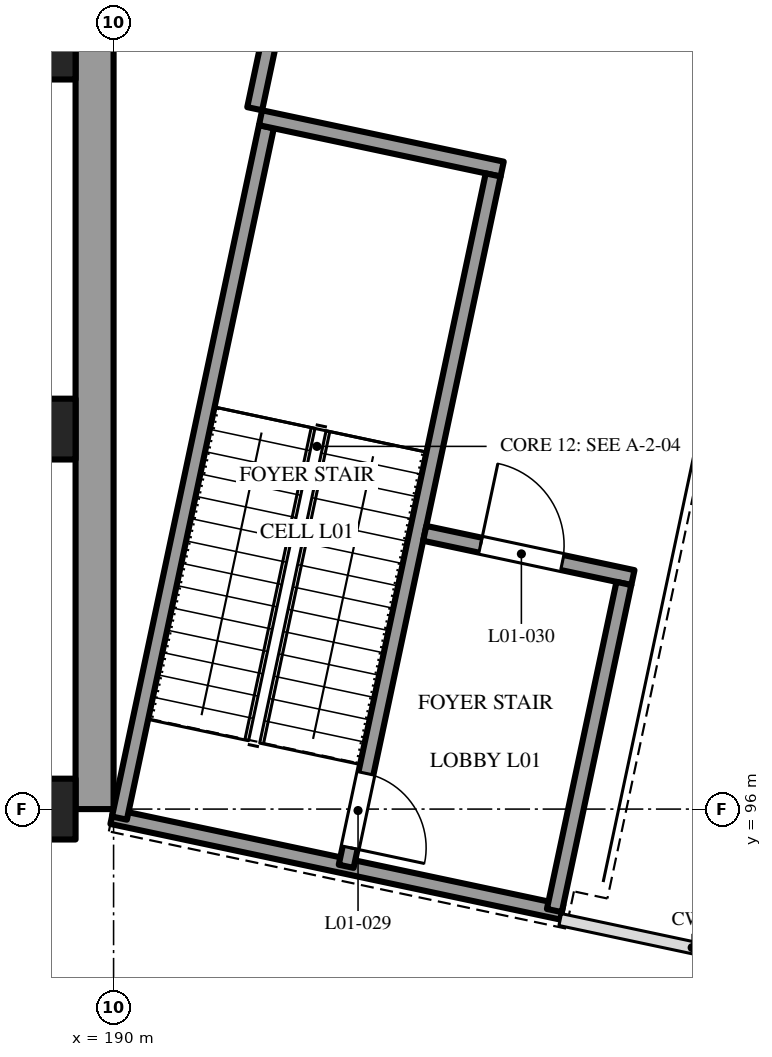
"""IFC4 building model, lengths in metres.
Left out: names, types, materials, properties, quantities, classifications, styles, units other than length and angle.
Written with IfcOpenShell. Run it as: python <this file> out.ifc"""

import sys

from ifc_helpers import new_model, si_unit, direction, frame, frame_2d, origin, origin_2d, place, context, subcontext, project, spatial, rectangle, extrude, element, fill, save


model = new_model("IFC4")
c1 = context("Model", 3, precision=1e-05, world=origin(), true_north=direction((0.0, 1.0)))
c2 = subcontext(c1, "Body", "Model", "MODEL_VIEW")
j1 = project(units=[si_unit("LENGTHUNIT", "METRE"), si_unit("PLANEANGLEUNIT", "RADIAN")], contexts=[c1])
p1 = place(None, origin())
s1 = spatial("IfcSite", under=j1, at=p1, CompositionType="ELEMENT")
p2 = place(p1, origin())
s2 = spatial("IfcBuilding", under=s1, at=p2, CompositionType="ELEMENT")
p3 = place(p2, frame((0.0, 0.0, 7.2)))
s3 = spatial("IfcBuildingStorey", under=s2, at=p3, CompositionType="ELEMENT", Elevation=7.2)
for number, where, z_axis, x_axis in (
    (1, (189.0, 96.0, 0.0), (0.0, 0.0, 1.0), (1.0, 0.0, 0.0)),
    (2, (189.0, 101.0, 0.0), (0.0, 0.0, 1.0), (1.0, 0.0, 0.0)),
    (3, (189.0, 106.0, 0.0), (0.0, 0.0, 1.0), (1.0, 0.0, 0.0)),
):
    element("IfcColumn", number, at=place(p3, frame(where, z_axis=z_axis, x_axis=x_axis)), inside=s3, PredefinedType="COLUMN", context=c2, shape_type="SweptSolid", body=[
        extrude(rectangle(XDim=1.0, YDim=0.8, at=origin_2d()), origin(), (0.0, 0.0, 1.0), 1.8),
    ])
p4 = place(p3, frame((189.75, 96.0, 0.0), z_axis=(0.0, 0.0, 1.0), x_axis=(0.0, 1.0, 0.0)))
e4 = element("IfcWall", 4, at=p4, inside=s3, PredefinedType="SOLIDWALL", context=c2, shape_type="SweptSolid", body=[
    extrude(rectangle(XDim=46.0, YDim=0.5, at=frame_2d((23.0, 0.0))), origin(), (0.0, 0.0, 1.0), 6.6),
])
p5 = place(p3, frame((189.979, 95.902, 0.0), z_axis=(0.0, 0.0, 1.0), x_axis=(0.978148901478, -0.207905571204, 0.0)))
e5 = element("IfcWall", 5, at=p5, inside=s3, PredefinedType="SOLIDWALL", context=c2, shape_type="SweptSolid", body=[
    extrude(rectangle(XDim=6.05, YDim=0.2, at=frame_2d((3.025, 0.0))), origin(), (0.0, 0.0, 1.0), 4.48),
])
p6 = place(p3, frame((190.077, 95.881, 0.0), z_axis=(0.0, 0.0, 1.0), x_axis=(0.207909931549, 0.978147974676, 0.0)))
e6 = element("IfcWall", 6, at=p6, inside=s3, PredefinedType="SOLIDWALL", context=c2, shape_type="SweptSolid", body=[
    extrude(rectangle(XDim=9.3, YDim=0.2, at=frame_2d((4.65, 0.0))), origin(), (0.0, 0.0, 1.0), 4.48),
])
p7 = place(p3, frame((191.934, 105.097, 0.0), z_axis=(0.0, 0.0, 1.0), x_axis=(0.978158278153, -0.207861451167, 0.0)))
e7 = element("IfcWall", 7, at=p7, inside=s3, PredefinedType="SOLIDWALL", context=c2, shape_type="SweptSolid", body=[
    extrude(rectangle(XDim=3.25, YDim=0.2, at=frame_2d((1.625, 0.0))), origin(), (0.0, 0.0, 1.0), 4.48),
])
p8 = place(p3, frame((193.06, 95.247, 0.0), z_axis=(0.0, 0.0, 1.0), x_axis=(0.207915270313, 0.978146839882, 0.0)))
e8 = element("IfcWall", 8, at=p8, inside=s3, PredefinedType="SOLIDWALL", context=c2, shape_type="SweptSolid", body=[
    extrude(rectangle(XDim=9.3, YDim=0.2, at=frame_2d((4.65, 0.0))), origin(), (0.0, 0.0, 1.0), 4.48),
])
p9 = place(p8, frame((0.25, 0.0, 0.0)))
e9 = element("IfcOpeningElement", 9, at=p9, cuts=e8, PredefinedType="OPENING", context=c2, shape_type="SweptSolid", body=[
    extrude(rectangle(XDim=1.0, YDim=2.1, at=frame_2d((0.5, 1.05))), frame((0.0, 0.11, 0.0), z_axis=(0.0, -1.0, 0.0), x_axis=(1.0, 0.0, 0.0)), (0.0, 0.0, 1.0), 0.22),
])
p10 = place(p3, frame((194.094, 99.628, 0.0), z_axis=(0.0, 0.0, 1.0), x_axis=(0.978138015478, -0.207956780791, 0.0)))
e10 = element("IfcWall", 10, at=p10, inside=s3, PredefinedType="SOLIDWALL", context=c2, shape_type="SweptSolid", body=[
    extrude(rectangle(XDim=2.8, YDim=0.2, at=frame_2d((1.4, 0.0))), origin(), (0.0, 0.0, 1.0), 4.48),
])
p11 = place(p10, frame((0.75, 0.0, 0.0)))
e11 = element("IfcOpeningElement", 11, at=p11, cuts=e10, PredefinedType="OPENING", context=c2, shape_type="SweptSolid", body=[
    extrude(rectangle(XDim=1.1, YDim=2.1, at=frame_2d((0.55, 1.05))), frame((0.0, 0.11, 0.0), z_axis=(0.0, -1.0, 0.0), x_axis=(1.0, 0.0, 0.0)), (0.0, 0.0, 1.0), 0.22),
])
p12 = place(p3, frame((195.799, 94.665, 0.0), z_axis=(0.0, 0.0, 1.0), x_axis=(0.207956302845, 0.978138117091, 0.0)))
e12 = element("IfcWall", 12, at=p12, inside=s3, PredefinedType="SOLIDWALL", context=c2, shape_type="SweptSolid", body=[
    extrude(rectangle(XDim=4.4, YDim=0.2, at=frame_2d((2.2, 0.0))), origin(), (0.0, 0.0, 1.0), 4.48),
])
p13 = place(p3, frame((191.856, 105.215, 0.0), z_axis=(0.0, 0.0, 1.0), x_axis=(0.207914134202, 0.978147081373, 0.0)))
e13 = element("IfcWall", 13, at=p13, inside=s3, PredefinedType="SOLIDWALL", context=c2, shape_type="SweptSolid", body=[
    extrude(rectangle(XDim=36.75, YDim=0.2, at=frame_2d((18.375, 0.0))), origin(), (0.0, 0.0, 1.0), 4.49),
])
p14 = place(p13, frame((3.5, 0.0, 0.9)))
e14 = element("IfcOpeningElement", 14, at=p14, cuts=e13, PredefinedType="OPENING", context=c2, shape_type="SweptSolid", body=[
    extrude(rectangle(XDim=3.0, YDim=2.4, at=frame_2d((1.5, 1.2))), frame((0.0, 0.11, 0.0), z_axis=(0.0, -1.0, 0.0), x_axis=(1.0, 0.0, 0.0)), (0.0, 0.0, 1.0), 0.22),
])
p15 = place(p13, frame((9.5, 0.0, 0.9)))
e15 = element("IfcOpeningElement", 15, at=p15, cuts=e13, PredefinedType="OPENING", context=c2, shape_type="SweptSolid", body=[
    extrude(rectangle(XDim=3.0, YDim=2.4, at=frame_2d((1.5, 1.2))), frame((0.0, 0.11, 0.0), z_axis=(0.0, -1.0, 0.0), x_axis=(1.0, 0.0, 0.0)), (0.0, 0.0, 1.0), 0.22),
])
p16 = place(p13, frame((15.5, 0.0, 0.9)))
e16 = element("IfcOpeningElement", 16, at=p16, cuts=e13, PredefinedType="OPENING", context=c2, shape_type="SweptSolid", body=[
    extrude(rectangle(XDim=3.0, YDim=2.4, at=frame_2d((1.5, 1.2))), frame((0.0, 0.11, 0.0), z_axis=(0.0, -1.0, 0.0), x_axis=(1.0, 0.0, 0.0)), (0.0, 0.0, 1.0), 0.22),
])
p17 = place(p13, frame((21.5, 0.0, 0.9)))
e17 = element("IfcOpeningElement", 17, at=p17, cuts=e13, PredefinedType="OPENING", context=c2, shape_type="SweptSolid", body=[
    extrude(rectangle(XDim=3.0, YDim=2.4, at=frame_2d((1.5, 1.2))), frame((0.0, 0.11, 0.0), z_axis=(0.0, -1.0, 0.0), x_axis=(1.0, 0.0, 0.0)), (0.0, 0.0, 1.0), 0.22),
])
p18 = place(p13, frame((27.5, 0.0, 0.9)))
e18 = element("IfcOpeningElement", 18, at=p18, cuts=e13, PredefinedType="OPENING", context=c2, shape_type="SweptSolid", body=[
    extrude(rectangle(XDim=3.0, YDim=2.4, at=frame_2d((1.5, 1.2))), frame((0.0, 0.11, 0.0), z_axis=(0.0, -1.0, 0.0), x_axis=(1.0, 0.0, 0.0)), (0.0, 0.0, 1.0), 0.22),
])
p19 = place(p9, frame((1.0, 0.0, 0.0), z_axis=(0.0, 0.0, 1.0), x_axis=(-1.0, 0.0, 0.0)))
e19 = element("IfcDoor", 19, at=p19, inside=s3, OperationType="SINGLE_SWING_RIGHT", PredefinedType="DOOR", context=c2, shape_type="SweptSolid", body=[
    extrude(rectangle(XDim=1.0, YDim=2.1, at=frame_2d((0.5, 1.05))), frame((0.0, 0.025, 0.0), z_axis=(0.0, -1.0, 0.0), x_axis=(1.0, 0.0, 0.0)), (0.0, 0.0, 1.0), 0.05),
])
fill(e9, e19)
p20 = place(p11, origin())
e20 = element("IfcDoor", 20, at=p20, inside=s3, OperationType="SINGLE_SWING_LEFT", PredefinedType="DOOR", context=c2, shape_type="SweptSolid", body=[
    extrude(rectangle(XDim=1.1, YDim=2.1, at=frame_2d((0.55, 1.05))), frame((0.0, 0.025, 0.0), z_axis=(0.0, -1.0, 0.0), x_axis=(1.0, 0.0, 0.0)), (0.0, 0.0, 1.0), 0.05),
])
fill(e11, e20)
save(model, sys.argv[1])
